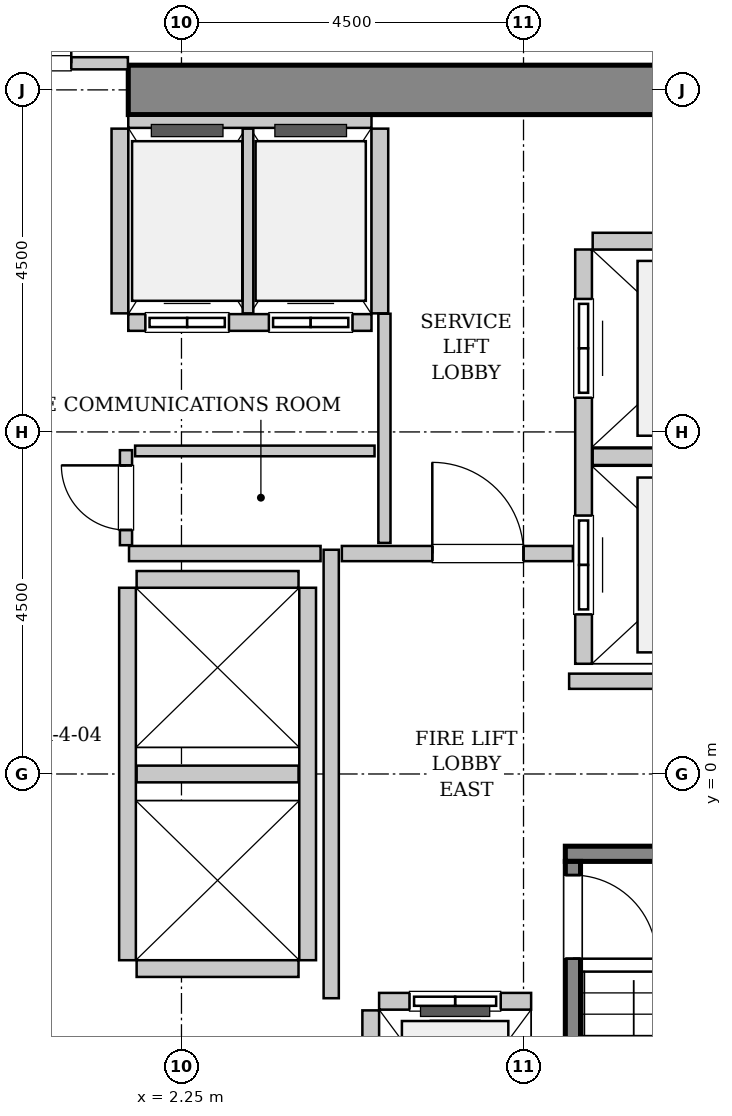
"""IFC4 building model, lengths in metres.
Left out: names, types, materials, properties, quantities, classifications, styles, units other than length and angle.
Written with IfcOpenShell. Run it as: python <this file> out.ifc"""

import sys

from ifc_helpers import new_model, si_unit, direction, frame, frame_2d, origin, place, context, subcontext, project, spatial, rectangle, extrude, source, transform, mapped, element, fill, save


model = new_model("IFC4")
c1 = context("Model", 3, precision=1e-05, world=origin(), true_north=direction((0.0, 1.0)))
c2 = subcontext(c1, "Body", "Model", "MODEL_VIEW")
j1 = project(units=[si_unit("LENGTHUNIT", "METRE"), si_unit("PLANEANGLEUNIT", "RADIAN")], contexts=[c1])
p1 = place(None, origin())
s1 = spatial("IfcSite", under=j1, at=p1, CompositionType="ELEMENT")
p2 = place(p1, origin())
s2 = spatial("IfcBuilding", under=s1, at=p2, CompositionType="ELEMENT")
p3 = place(p2, frame((0.0, 0.0, 6.0)))
s3 = spatial("IfcBuildingStorey", under=s2, at=p3, CompositionType="ELEMENT", Elevation=6.0)
m1 = source(origin(), c2, "Body", "SweptSolid", [
    extrude(rectangle(XDim=10.025, YDim=0.65, at=frame_2d((5.012, 0.0))), origin(), (0.0, 0.0, 1.0), 5.4),
])
p4 = place(p3, frame((1.55, 9.0, 0.0), z_axis=(0.0, 0.0, 1.0), x_axis=(1.0, 0.0, 0.0)))
e1 = element("IfcWall", 1, at=p4, inside=s3, PredefinedType="SHEAR", context=c2, shape_type="MappedRepresentation", body=[
    mapped(m1, transform((0.0, 0.0, 0.0), x_axis=(1.0, 0.0, 0.0), y_axis=(0.0, 1.0, 0.0), z_axis=(0.0, 0.0, 1.0), scale=1.0)),
])
m2 = source(origin(), c2, "Body", "SweptSolid", [
    extrude(rectangle(XDim=3.4, YDim=0.2, at=frame_2d((1.7, 0.0))), origin(), (0.0, 0.0, 1.0), 5.4),
])
p5 = place(p3, frame((7.3, -1.05, 0.0), z_axis=(0.0, 0.0, 1.0), x_axis=(1.0, 0.0, 0.0)))
e2 = element("IfcWall", 2, at=p5, inside=s3, PredefinedType="SOLIDWALL", context=c2, shape_type="MappedRepresentation", body=[
    mapped(m2, transform((0.0, 0.0, 0.0), x_axis=(1.0, 0.0, 0.0), y_axis=(0.0, 1.0, 0.0), z_axis=(0.0, 0.0, 1.0), scale=1.0)),
])
m3 = source(origin(), c2, "Body", "SweptSolid", [
    extrude(rectangle(XDim=7.1, YDim=0.2, at=frame_2d((3.55, 0.0))), origin(), (0.0, 0.0, 1.0), 5.4),
])
p6 = place(p3, frame((7.4, -1.15, 0.0), z_axis=(0.0, 0.0, 1.0), x_axis=(0.0, -1.0, 0.0)))
e3 = element("IfcWall", 3, at=p6, inside=s3, PredefinedType="SOLIDWALL", context=c2, shape_type="MappedRepresentation", body=[
    mapped(m3, transform((0.0, 0.0, 0.0), x_axis=(1.0, 0.0, 0.0), y_axis=(0.0, 1.0, 0.0), z_axis=(0.0, 0.0, 1.0), scale=1.0)),
])
p7 = place(p6, frame((0.18, 0.0, 0.0)))
e4 = element("IfcOpeningElement", 4, at=p7, cuts=e3, PredefinedType="OPENING", context=c2, shape_type="SweptSolid", body=[
    extrude(rectangle(XDim=1.1, YDim=2.15, at=frame_2d((0.55, 1.075))), frame((0.0, 0.11, 0.0), z_axis=(0.0, -1.0, 0.0), x_axis=(1.0, 0.0, 0.0)), (0.0, 0.0, 1.0), 0.22),
])
m4 = source(origin(), c2, "Body", "SweptSolid", [
    extrude(rectangle(XDim=2.0, YDim=0.22, at=frame_2d((1.0, 0.0))), origin(), (0.0, 0.0, 1.0), 5.085),
])
p8 = place(p3, frame((6.85, -2.99, 0.0), z_axis=(0.0, 0.0, 1.0), x_axis=(-1.0, 0.0, 0.0)))
e5 = element("IfcWall", 5, at=p8, inside=s3, PredefinedType="SOLIDWALL", context=c2, shape_type="MappedRepresentation", body=[
    mapped(m4, transform((0.0, 0.0, 0.0), x_axis=(1.0, 0.0, 0.0), y_axis=(0.0, 1.0, 0.0), z_axis=(0.0, 0.0, 1.0), scale=1.0)),
])
p9 = place(p8, frame((0.4, 0.0, 0.0)))
e6 = element("IfcOpeningElement", 6, at=p9, cuts=e5, PredefinedType="OPENING", context=c2, shape_type="SweptSolid", body=[
    extrude(rectangle(XDim=1.2, YDim=2.2, at=frame_2d((0.6, 1.1))), frame((0.0, 0.12, 0.0), z_axis=(0.0, -1.0, 0.0), x_axis=(1.0, 0.0, 0.0)), (0.0, 0.0, 1.0), 0.24),
])
m5 = source(origin(), c2, "Body", "SweptSolid", [
    extrude(rectangle(XDim=2.68, YDim=0.22, at=frame_2d((1.34, 0.0))), origin(), (0.0, 0.0, 1.0), 5.085),
])
p10 = place(p3, frame((4.74, -3.11, 0.0), z_axis=(0.0, 0.0, 1.0), x_axis=(0.0, -1.0, 0.0)))
e7 = element("IfcWall", 7, at=p10, inside=s3, PredefinedType="SOLIDWALL", context=c2, shape_type="MappedRepresentation", body=[
    mapped(m5, transform((0.0, 0.0, 0.0), x_axis=(1.0, 0.0, 0.0), y_axis=(0.0, 1.0, 0.0), z_axis=(0.0, 0.0, 1.0), scale=1.0)),
])
m6 = source(origin(), c2, "Body", "SweptSolid", [
    extrude(rectangle(XDim=5.45, YDim=0.22, at=frame_2d((2.725, 0.0))), origin(), (0.0, 0.0, 1.0), 5.085),
])
p11 = place(p3, frame((7.54, 6.9, 0.0), z_axis=(0.0, 0.0, 1.0), x_axis=(0.0, -1.0, 0.0)))
e8 = element("IfcWall", 8, at=p11, inside=s3, PredefinedType="SOLIDWALL", context=c2, shape_type="MappedRepresentation", body=[
    mapped(m6, transform((0.0, 0.0, 0.0), x_axis=(1.0, 0.0, 0.0), y_axis=(0.0, 1.0, 0.0), z_axis=(0.0, 0.0, 1.0), scale=1.0)),
])
p12 = place(p11, frame((3.5, 0.0, 0.0)))
e9 = element("IfcOpeningElement", 9, at=p12, cuts=e8, PredefinedType="OPENING", context=c2, shape_type="SweptSolid", body=[
    extrude(rectangle(XDim=1.3, YDim=2.3, at=frame_2d((0.65, 1.15))), frame((0.0, 0.12, 0.0), z_axis=(0.0, -1.0, 0.0), x_axis=(1.0, 0.0, 0.0)), (0.0, 0.0, 1.0), 0.24),
])
p13 = place(p11, frame((0.65, 0.0, 0.0)))
e10 = element("IfcOpeningElement", 10, at=p13, cuts=e8, PredefinedType="OPENING", context=c2, shape_type="SweptSolid", body=[
    extrude(rectangle(XDim=1.3, YDim=2.3, at=frame_2d((0.65, 1.15))), frame((0.0, 0.12, 0.0), z_axis=(0.0, -1.0, 0.0), x_axis=(1.0, 0.0, 0.0)), (0.0, 0.0, 1.0), 0.24),
])
m7 = source(origin(), c2, "Body", "SweptSolid", [
    extrude(rectangle(XDim=2.78, YDim=0.22, at=frame_2d((1.39, 0.0))), origin(), (0.0, 0.0, 1.0), 5.085),
])
for number, where, z_axis, x_axis in (
    (11, (7.66, 4.175, 0.0), (0.0, 0.0, 1.0), (1.0, 0.0, 0.0)),
    (12, (10.44, 7.01, 0.0), (0.0, 0.0, 1.0), (-1.0, 0.0, 0.0)),
):
    element("IfcWall", number, at=place(p3, frame(where, z_axis=z_axis, x_axis=x_axis)), inside=s3, PredefinedType="SOLIDWALL", context=c2, shape_type="MappedRepresentation", body=[
        mapped(m7, transform((0.0, 0.0, 0.0), x_axis=(1.0, 0.0, 0.0), y_axis=(0.0, 1.0, 0.0), z_axis=(0.0, 0.0, 1.0), scale=1.0)),
    ])
m8 = source(origin(), c2, "Body", "SweptSolid", [
    extrude(rectangle(XDim=3.2, YDim=0.22, at=frame_2d((1.6, 0.0))), origin(), (0.0, 0.0, 1.0), 5.085),
])
p14 = place(p3, frame((1.55, 5.94, 0.0), z_axis=(0.0, 0.0, 1.0), x_axis=(1.0, 0.0, 0.0)))
e13 = element("IfcWall", 13, at=p14, inside=s3, PredefinedType="SOLIDWALL", context=c2, shape_type="MappedRepresentation", body=[
    mapped(m8, transform((0.0, 0.0, 0.0), x_axis=(1.0, 0.0, 0.0), y_axis=(0.0, 1.0, 0.0), z_axis=(0.0, 0.0, 1.0), scale=1.0)),
])
p15 = place(p14, frame((0.225, 0.0, 0.0)))
e14 = element("IfcOpeningElement", 14, at=p15, cuts=e13, PredefinedType="OPENING", context=c2, shape_type="SweptSolid", body=[
    extrude(rectangle(XDim=1.1, YDim=2.2, at=frame_2d((0.55, 1.1))), frame((0.0, 0.12, 0.0), z_axis=(0.0, -1.0, 0.0), x_axis=(1.0, 0.0, 0.0)), (0.0, 0.0, 1.0), 0.24),
])
p16 = place(p14, frame((1.85, 0.0, 0.0)))
e15 = element("IfcOpeningElement", 15, at=p16, cuts=e13, PredefinedType="OPENING", context=c2, shape_type="SweptSolid", body=[
    extrude(rectangle(XDim=1.1, YDim=2.2, at=frame_2d((0.55, 1.1))), frame((0.0, 0.12, 0.0), z_axis=(0.0, -1.0, 0.0), x_axis=(1.0, 0.0, 0.0)), (0.0, 0.0, 1.0), 0.24),
])
m9 = source(origin(), c2, "Body", "SweptSolid", [
    extrude(rectangle(XDim=3.2, YDim=0.16, at=frame_2d((1.6, 0.0))), origin(), (0.0, 0.0, 1.0), 3.975),
])
p17 = place(p3, frame((4.75, 8.58, 0.0), z_axis=(0.0, 0.0, 1.0), x_axis=(-1.0, 0.0, 0.0)))
e16 = element("IfcWall", 16, at=p17, inside=s3, PredefinedType="PARTITIONING", context=c2, shape_type="MappedRepresentation", body=[
    mapped(m9, transform((0.0, 0.0, 0.0), x_axis=(1.0, 0.0, 0.0), y_axis=(0.0, 1.0, 0.0), z_axis=(0.0, 0.0, 1.0), scale=1.0)),
])
m10 = source(origin(), c2, "Body", "SweptSolid", [
    extrude(rectangle(XDim=2.43, YDim=0.22, at=frame_2d((1.215, 0.0))), origin(), (0.0, 0.0, 1.0), 5.085),
])
p18 = place(p3, frame((1.44, 8.49, 0.0), z_axis=(0.0, 0.0, 1.0), x_axis=(0.0, -1.0, 0.0)))
e17 = element("IfcWall", 17, at=p18, inside=s3, PredefinedType="SOLIDWALL", context=c2, shape_type="MappedRepresentation", body=[
    mapped(m10, transform((0.0, 0.0, 0.0), x_axis=(1.0, 0.0, 0.0), y_axis=(0.0, 1.0, 0.0), z_axis=(0.0, 0.0, 1.0), scale=1.0)),
])
m11 = source(origin(), c2, "Body", "SweptSolid", [
    extrude(rectangle(XDim=2.43, YDim=0.14, at=frame_2d((1.215, 0.0))), origin(), (0.0, 0.0, 1.0), 5.085),
])
p19 = place(p3, frame((3.125, 6.06, 0.0), z_axis=(0.0, 0.0, 1.0), x_axis=(0.0, 1.0, 0.0)))
e18 = element("IfcWall", 18, at=p19, inside=s3, PredefinedType="PARTITIONING", context=c2, shape_type="MappedRepresentation", body=[
    mapped(m11, transform((0.0, 0.0, 0.0), x_axis=(1.0, 0.0, 0.0), y_axis=(0.0, 1.0, 0.0), z_axis=(0.0, 0.0, 1.0), scale=1.0)),
])
p20 = place(p3, frame((4.86, 6.06, 0.0), z_axis=(0.0, 0.0, 1.0), x_axis=(0.0, 1.0, 0.0)))
e19 = element("IfcWall", 19, at=p20, inside=s3, PredefinedType="SOLIDWALL", context=c2, shape_type="MappedRepresentation", body=[
    mapped(m10, transform((0.0, 0.0, 0.0), x_axis=(1.0, 0.0, 0.0), y_axis=(0.0, 1.0, 0.0), z_axis=(0.0, 0.0, 1.0), scale=1.0)),
])
m12 = source(origin(), c2, "Body", "SweptSolid", [
    extrude(rectangle(XDim=4.9, YDim=0.22, at=frame_2d((2.45, 0.0))), origin(), (0.0, 0.0, 1.0), 5.085),
])
for number, where, z_axis, x_axis in (
    (20, (1.54, 2.45, 0.0), (0.0, 0.0, 1.0), (0.0, -1.0, 0.0)),
    (21, (3.91, -2.45, 0.0), (0.0, 0.0, 1.0), (0.0, 1.0, 0.0)),
):
    element("IfcWall", number, at=place(p3, frame(where, z_axis=z_axis, x_axis=x_axis)), inside=s3, PredefinedType="SOLIDWALL", context=c2, shape_type="MappedRepresentation", body=[
        mapped(m12, transform((0.0, 0.0, 0.0), x_axis=(1.0, 0.0, 0.0), y_axis=(0.0, 1.0, 0.0), z_axis=(0.0, 0.0, 1.0), scale=1.0)),
    ])
m13 = source(origin(), c2, "Body", "SweptSolid", [
    extrude(rectangle(XDim=2.13, YDim=0.22, at=frame_2d((1.065, 0.0))), origin(), (0.0, 0.0, 1.0), 5.085),
])
for number, where, z_axis, x_axis in (
    (22, (1.66, -2.56, 0.0), (0.0, 0.0, 1.0), (1.0, 0.0, 0.0)),
    (23, (1.66, 0.0, 0.0), (0.0, 0.0, 1.0), (1.0, 0.0, 0.0)),
    (24, (3.79, 2.56, 0.0), (0.0, 0.0, 1.0), (-1.0, 0.0, 0.0)),
):
    element("IfcWall", number, at=place(p3, frame(where, z_axis=z_axis, x_axis=x_axis)), inside=s3, PredefinedType="SOLIDWALL", context=c2, shape_type="MappedRepresentation", body=[
        mapped(m13, transform((0.0, 0.0, 0.0), x_axis=(1.0, 0.0, 0.0), y_axis=(0.0, 1.0, 0.0), z_axis=(0.0, 0.0, 1.0), scale=1.0)),
    ])
m14 = source(origin(), c2, "Body", "SweptSolid", [
    extrude(rectangle(XDim=5.9, YDim=0.2, at=frame_2d((2.95, 0.0))), origin(), (0.0, 0.0, 1.0), 5.085),
])
p21 = place(p3, frame((4.22, -2.95, 0.0), z_axis=(0.0, 0.0, 1.0), x_axis=(0.0, 1.0, 0.0)))
e25 = element("IfcWall", 25, at=p21, inside=s3, PredefinedType="PARTITIONING", context=c2, shape_type="MappedRepresentation", body=[
    mapped(m14, transform((0.0, 0.0, 0.0), x_axis=(1.0, 0.0, 0.0), y_axis=(0.0, 1.0, 0.0), z_axis=(0.0, 0.0, 1.0), scale=1.0)),
])
m15 = source(origin(), c2, "Body", "SweptSolid", [
    extrude(rectangle(XDim=2.52, YDim=0.2, at=frame_2d((1.26, 0.0))), origin(), (0.0, 0.0, 1.0), 5.085),
])
p22 = place(p3, frame((1.56, 2.9, 0.0), z_axis=(0.0, 0.0, 1.0), x_axis=(1.0, 0.0, 0.0)))
e26 = element("IfcWall", 26, at=p22, inside=s3, PredefinedType="PARTITIONING", context=c2, shape_type="MappedRepresentation", body=[
    mapped(m15, transform((0.0, 0.0, 0.0), x_axis=(1.0, 0.0, 0.0), y_axis=(0.0, 1.0, 0.0), z_axis=(0.0, 0.0, 1.0), scale=1.0)),
])
m16 = source(origin(), c2, "Body", "SweptSolid", [
    extrude(rectangle(XDim=3.04, YDim=0.2, at=frame_2d((1.52, 0.0))), origin(), (0.0, 0.0, 1.0), 5.085),
])
p23 = place(p3, frame((4.36, 2.9, 0.0), z_axis=(0.0, 0.0, 1.0), x_axis=(1.0, 0.0, 0.0)))
e27 = element("IfcWall", 27, at=p23, inside=s3, PredefinedType="PARTITIONING", context=c2, shape_type="MappedRepresentation", body=[
    mapped(m16, transform((0.0, 0.0, 0.0), x_axis=(1.0, 0.0, 0.0), y_axis=(0.0, 1.0, 0.0), z_axis=(0.0, 0.0, 1.0), scale=1.0)),
])
p24 = place(p23, frame((1.19, 0.0, 0.0)))
e28 = element("IfcOpeningElement", 28, at=p24, cuts=e27, PredefinedType="OPENING", context=c2, shape_type="SweptSolid", body=[
    extrude(rectangle(XDim=1.2, YDim=2.15, at=frame_2d((0.6, 1.075))), frame((0.0, 0.11, 0.0), z_axis=(0.0, -1.0, 0.0), x_axis=(1.0, 0.0, 0.0)), (0.0, 0.0, 1.0), 0.22),
])
m17 = source(origin(), c2, "Body", "SweptSolid", [
    extrude(rectangle(XDim=4.11, YDim=0.2, at=frame_2d((2.055, 0.0))), origin(), (0.0, 0.0, 1.0), 5.085),
])
p25 = place(p3, frame((7.35, 1.22, 0.0), z_axis=(0.0, 0.0, 1.0), x_axis=(1.0, 0.0, 0.0)))
e29 = element("IfcWall", 29, at=p25, inside=s3, PredefinedType="PARTITIONING", context=c2, shape_type="MappedRepresentation", body=[
    mapped(m17, transform((0.0, 0.0, 0.0), x_axis=(1.0, 0.0, 0.0), y_axis=(0.0, 1.0, 0.0), z_axis=(0.0, 0.0, 1.0), scale=1.0)),
])
m18 = source(origin(), c2, "Body", "SweptSolid", [
    extrude(rectangle(XDim=3.09, YDim=0.16, at=frame_2d((1.545, 0.0))), origin(), (0.0, 0.0, 1.0), 3.975),
])
p26 = place(p3, frame((-1.545, 9.35, 0.0), z_axis=(0.0, 0.0, 1.0), x_axis=(1.0, 0.0, 0.0)))
e30 = element("IfcWall", 30, at=p26, inside=s3, PredefinedType="PARTITIONING", context=c2, shape_type="MappedRepresentation", body=[
    mapped(m18, transform((0.0, 0.0, 0.0), x_axis=(1.0, 0.0, 0.0), y_axis=(0.0, 1.0, 0.0), z_axis=(0.0, 0.0, 1.0), scale=1.0)),
])
p27 = place(p26, frame((0.745, 0.0, 0.0)))
e31 = element("IfcOpeningElement", 31, at=p27, cuts=e30, PredefinedType="OPENING", context=c2, shape_type="SweptSolid", body=[
    extrude(rectangle(XDim=1.6, YDim=2.3, at=frame_2d((0.8, 1.15))), frame((0.0, 0.09, 0.0), z_axis=(0.0, -1.0, 0.0), x_axis=(1.0, 0.0, 0.0)), (0.0, 0.0, 1.0), 0.18),
])
m19 = source(origin(), c2, "Body", "SweptSolid", [
    extrude(rectangle(XDim=3.015, YDim=0.16, at=frame_2d((1.507, 0.0))), origin(), (0.0, 0.0, 1.0), 5.085),
])
p28 = place(p3, frame((4.92, 3.04, 0.0), z_axis=(0.0, 0.0, 1.0), x_axis=(0.0, 1.0, 0.0)))
e32 = element("IfcWall", 32, at=p28, inside=s3, PredefinedType="PARTITIONING", context=c2, shape_type="MappedRepresentation", body=[
    mapped(m19, transform((0.0, 0.0, 0.0), x_axis=(1.0, 0.0, 0.0), y_axis=(0.0, 1.0, 0.0), z_axis=(0.0, 0.0, 1.0), scale=1.0)),
])
m20 = source(origin(), c2, "Body", "SweptSolid", [
    extrude(rectangle(XDim=1.25, YDim=0.16, at=frame_2d((0.625, 0.0))), origin(), (0.0, 0.0, 1.0), 5.085),
])
p29 = place(p3, frame((1.52, 3.01, 0.0), z_axis=(0.0, 0.0, 1.0), x_axis=(0.0, 1.0, 0.0)))
e33 = element("IfcWall", 33, at=p29, inside=s3, PredefinedType="PARTITIONING", context=c2, shape_type="MappedRepresentation", body=[
    mapped(m20, transform((0.0, 0.0, 0.0), x_axis=(1.0, 0.0, 0.0), y_axis=(0.0, 1.0, 0.0), z_axis=(0.0, 0.0, 1.0), scale=1.0)),
])
p30 = place(p29, frame((0.2, 0.0, 0.0)))
e34 = element("IfcOpeningElement", 34, at=p30, cuts=e33, PredefinedType="OPENING", context=c2, shape_type="SweptSolid", body=[
    extrude(rectangle(XDim=0.85, YDim=2.1, at=frame_2d((0.425, 1.05))), frame((0.0, 0.09, 0.0), z_axis=(0.0, -1.0, 0.0), x_axis=(1.0, 0.0, 0.0)), (0.0, 0.0, 1.0), 0.18),
])
m21 = source(origin(), c2, "Body", "SweptSolid", [
    extrude(rectangle(XDim=3.15, YDim=0.14, at=frame_2d((1.575, 0.0))), origin(), (0.0, 0.0, 1.0), 5.085),
])
p31 = place(p3, frame((1.64, 4.25, 0.0), z_axis=(0.0, 0.0, 1.0), x_axis=(1.0, 0.0, 0.0)))
e35 = element("IfcWall", 35, at=p31, inside=s3, PredefinedType="PARTITIONING", context=c2, shape_type="MappedRepresentation", body=[
    mapped(m21, transform((0.0, 0.0, 0.0), x_axis=(1.0, 0.0, 0.0), y_axis=(0.0, 1.0, 0.0), z_axis=(0.0, 0.0, 1.0), scale=1.0)),
])
m22 = source(origin(), c2, "Body", "SweptSolid", [
    extrude(rectangle(XDim=1.1, YDim=2.15, at=frame_2d((0.55, 1.075))), frame((0.0, 0.025, 0.0), z_axis=(0.0, -1.0, 0.0), x_axis=(1.0, 0.0, 0.0)), (0.0, 0.0, 1.0), 0.05),
])
p32 = place(p7, origin())
e36 = element("IfcDoor", 36, at=p32, inside=s3, OperationType="SINGLE_SWING_RIGHT", PredefinedType="DOOR", context=c2, shape_type="MappedRepresentation", body=[
    mapped(m22, transform((0.0, 0.0, 0.0), x_axis=(1.0, 0.0, 0.0), y_axis=(0.0, 1.0, 0.0), z_axis=(0.0, 0.0, 1.0), scale=1.0)),
])
fill(e4, e36)
m23 = source(origin(), c2, "Body", "SweptSolid", [
    extrude(rectangle(XDim=1.2, YDim=2.2, at=frame_2d((0.6, 1.1))), frame((0.0, 0.025, 0.0), z_axis=(0.0, -1.0, 0.0), x_axis=(1.0, 0.0, 0.0)), (0.0, 0.0, 1.0), 0.05),
])
p33 = place(p9, origin())
e37 = element("IfcDoor", 37, at=p33, inside=s3, OperationType="SLIDING_TO_LEFT", PredefinedType="DOOR", context=c2, shape_type="MappedRepresentation", body=[
    mapped(m23, transform((0.0, 0.0, 0.0), x_axis=(1.0, 0.0, 0.0), y_axis=(0.0, 1.0, 0.0), z_axis=(0.0, 0.0, 1.0), scale=1.0)),
])
fill(e6, e37)
m24 = source(origin(), c2, "Body", "SweptSolid", [
    extrude(rectangle(XDim=1.3, YDim=2.3, at=frame_2d((0.65, 1.15))), frame((0.0, 0.025, 0.0), z_axis=(0.0, -1.0, 0.0), x_axis=(1.0, 0.0, 0.0)), (0.0, 0.0, 1.0), 0.05),
])
p34 = place(p12, origin())
e38 = element("IfcDoor", 38, at=p34, inside=s3, OperationType="SLIDING_TO_RIGHT", PredefinedType="DOOR", context=c2, shape_type="MappedRepresentation", body=[
    mapped(m24, transform((0.0, 0.0, 0.0), x_axis=(1.0, 0.0, 0.0), y_axis=(0.0, 1.0, 0.0), z_axis=(0.0, 0.0, 1.0), scale=1.0)),
])
fill(e9, e38)
p35 = place(p13, origin())
e39 = element("IfcDoor", 39, at=p35, inside=s3, OperationType="SLIDING_TO_RIGHT", PredefinedType="DOOR", context=c2, shape_type="MappedRepresentation", body=[
    mapped(m24, transform((0.0, 0.0, 0.0), x_axis=(1.0, 0.0, 0.0), y_axis=(0.0, 1.0, 0.0), z_axis=(0.0, 0.0, 1.0), scale=1.0)),
])
fill(e10, e39)
m25 = source(origin(), c2, "Body", "SweptSolid", [
    extrude(rectangle(XDim=1.1, YDim=2.2, at=frame_2d((0.55, 1.1))), frame((0.0, 0.025, 0.0), z_axis=(0.0, -1.0, 0.0), x_axis=(1.0, 0.0, 0.0)), (0.0, 0.0, 1.0), 0.05),
])
p36 = place(p15, origin())
e40 = element("IfcDoor", 40, at=p36, inside=s3, OperationType="DOUBLE_DOOR_SLIDING", PredefinedType="DOOR", context=c2, shape_type="MappedRepresentation", body=[
    mapped(m25, transform((0.0, 0.0, 0.0), x_axis=(1.0, 0.0, 0.0), y_axis=(0.0, 1.0, 0.0), z_axis=(0.0, 0.0, 1.0), scale=1.0)),
])
fill(e14, e40)
p37 = place(p16, origin())
e41 = element("IfcDoor", 41, at=p37, inside=s3, OperationType="DOUBLE_DOOR_SLIDING", PredefinedType="DOOR", context=c2, shape_type="MappedRepresentation", body=[
    mapped(m25, transform((0.0, 0.0, 0.0), x_axis=(1.0, 0.0, 0.0), y_axis=(0.0, 1.0, 0.0), z_axis=(0.0, 0.0, 1.0), scale=1.0)),
])
fill(e15, e41)
m26 = source(origin(), c2, "Body", "SweptSolid", [
    extrude(rectangle(XDim=1.2, YDim=2.15, at=frame_2d((0.6, 1.075))), frame((0.0, 0.025, 0.0), z_axis=(0.0, -1.0, 0.0), x_axis=(1.0, 0.0, 0.0)), (0.0, 0.0, 1.0), 0.05),
])
p38 = place(p24, origin())
e42 = element("IfcDoor", 42, at=p38, inside=s3, OperationType="SINGLE_SWING_LEFT", PredefinedType="DOOR", context=c2, shape_type="MappedRepresentation", body=[
    mapped(m26, transform((0.0, 0.0, 0.0), x_axis=(1.0, 0.0, 0.0), y_axis=(0.0, 1.0, 0.0), z_axis=(0.0, 0.0, 1.0), scale=1.0)),
])
fill(e28, e42)
m27 = source(origin(), c2, "Body", "SweptSolid", [
    extrude(rectangle(XDim=1.6, YDim=2.3, at=frame_2d((0.8, 1.15))), frame((0.0, 0.025, 0.0), z_axis=(0.0, -1.0, 0.0), x_axis=(1.0, 0.0, 0.0)), (0.0, 0.0, 1.0), 0.05),
])
p39 = place(p27, origin())
e43 = element("IfcDoor", 43, at=p39, inside=s3, OperationType="DOUBLE_DOOR_SINGLE_SWING", PredefinedType="DOOR", context=c2, shape_type="MappedRepresentation", body=[
    mapped(m27, transform((0.0, 0.0, 0.0), x_axis=(1.0, 0.0, 0.0), y_axis=(0.0, 1.0, 0.0), z_axis=(0.0, 0.0, 1.0), scale=1.0)),
])
fill(e31, e43)
m28 = source(origin(), c2, "Body", "SweptSolid", [
    extrude(rectangle(XDim=0.85, YDim=2.1, at=frame_2d((0.425, 1.05))), frame((0.0, 0.025, 0.0), z_axis=(0.0, -1.0, 0.0), x_axis=(1.0, 0.0, 0.0)), (0.0, 0.0, 1.0), 0.05),
])
p40 = place(p30, origin())
e44 = element("IfcDoor", 44, at=p40, inside=s3, OperationType="SINGLE_SWING_RIGHT", PredefinedType="DOOR", context=c2, shape_type="MappedRepresentation", body=[
    mapped(m28, transform((0.0, 0.0, 0.0), x_axis=(1.0, 0.0, 0.0), y_axis=(0.0, 1.0, 0.0), z_axis=(0.0, 0.0, 1.0), scale=1.0)),
])
fill(e34, e44)
save(model, sys.argv[1])
